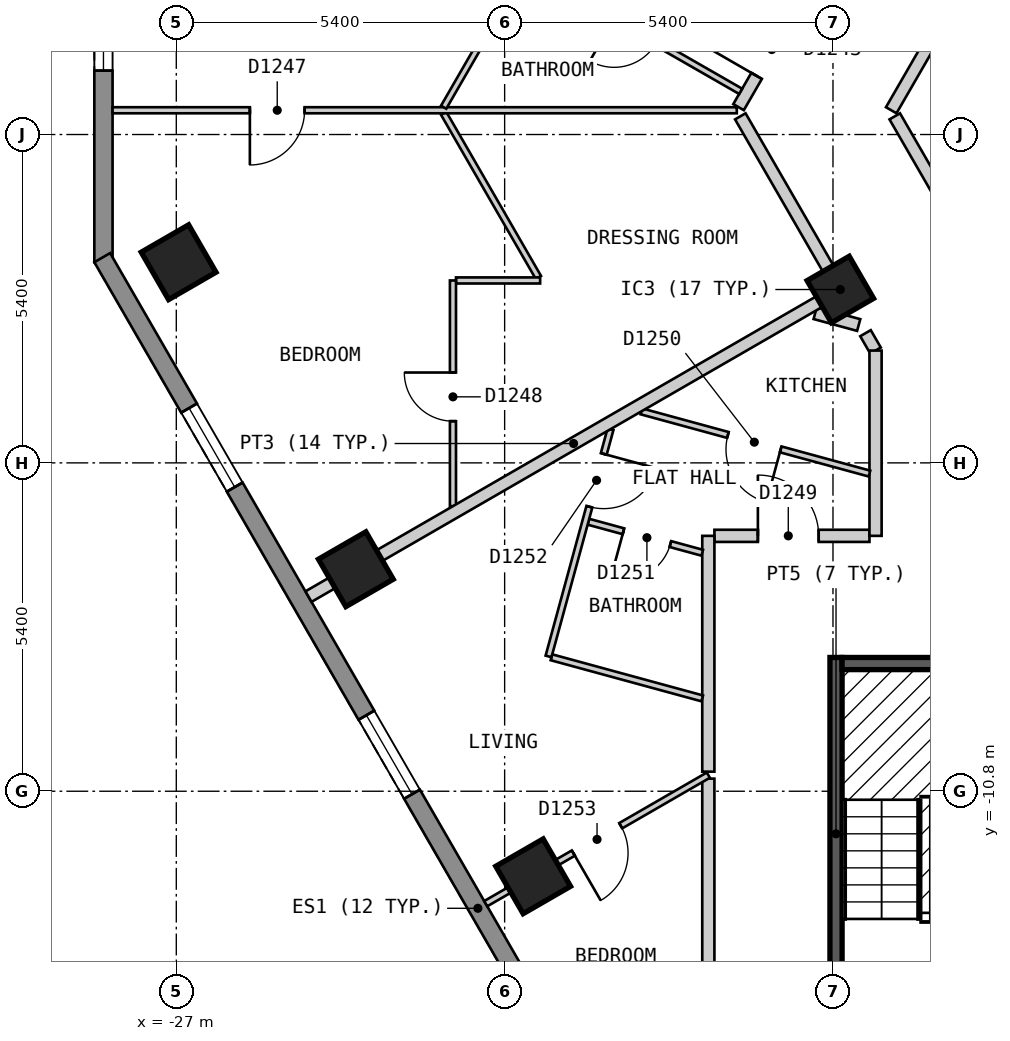
"""IFC4 building model, lengths in metres.
Left out: names, types, materials, properties, quantities, classifications, styles, units other than length and angle.
Written with IfcOpenShell. Run it as: python <this file> out.ifc"""

import sys

from ifc_helpers import new_model, si_unit, direction, frame, frame_2d, origin, origin_2d, place, context, subcontext, project, spatial, polyline, rectangle, outline, extrude, element, fill, save


model = new_model("IFC4")
c1 = context("Model", 3, precision=1e-05, world=origin(), true_north=direction((0.0, 1.0)))
c2 = subcontext(c1, "Body", "Model", "MODEL_VIEW")
j1 = project(units=[si_unit("LENGTHUNIT", "METRE"), si_unit("PLANEANGLEUNIT", "RADIAN")], contexts=[c1])
p1 = place(None, origin())
s1 = spatial("IfcSite", under=j1, at=p1, CompositionType="ELEMENT")
p2 = place(p1, origin())
s2 = spatial("IfcBuilding", under=s1, at=p2, CompositionType="ELEMENT")
p3 = place(p2, frame((0.0, 0.0, 129.6)))
s3 = spatial("IfcBuildingStorey", under=s2, at=p3, CompositionType="ELEMENT", Elevation=129.6)
for number, where, z_axis, x_axis in (
    (1, (-26.962, -2.1, 0.0), (0.0, 0.0, 1.0), (0.5, -0.866, 0.0)),
    (2, (-24.047, -7.149, 0.0), (0.0, 0.0, 1.0), (0.5, -0.866, 0.0)),
    (3, (-21.131, -12.199, 0.0), (0.0, 0.0, 1.0), (0.5, -0.866, 0.0)),
):
    element("IfcColumn", number, at=place(p3, frame(where, z_axis=z_axis, x_axis=x_axis)), inside=s3, PredefinedType="COLUMN", context=c2, shape_type="SweptSolid", body=[
        extrude(rectangle(XDim=0.9, YDim=0.9, at=origin_2d()), origin(), (0.0, 0.0, 1.0), 3.0),
    ])
p4 = place(p3, frame((-16.079, -2.549, 0.0), z_axis=(0.0, 0.0, 1.0), x_axis=(0.5, -0.866025403784, 0.0)))
e4 = element("IfcColumn", 4, at=p4, inside=s3, PredefinedType="COLUMN", context=c2, shape_type="SweptSolid", body=[
    extrude(rectangle(XDim=0.8, YDim=0.8, at=origin_2d()), origin(), (0.0, 0.0, 1.0), 3.0),
])
p5 = place(p3, frame((-28.198, 2.9, 0.0), z_axis=(0.0, 0.0, 1.0), x_axis=(0.0, -1.0, 0.0)))
e5 = element("IfcWall", 5, at=p5, inside=s3, PredefinedType="SOLIDWALL", context=c2, shape_type="SweptSolid", body=[
    extrude(outline(polyline([(0.0, -0.15), (5.0, -0.15), (4.92, 0.15), (0.08, 0.15), (0.0, -0.15)])), origin(), (0.0, 0.0, 1.0), 2.7),
])
p6 = place(p5, frame((0.65, 0.0, 0.15)))
e6 = element("IfcOpeningElement", 6, at=p6, cuts=e5, PredefinedType="OPENING", context=c2, shape_type="SweptSolid", body=[
    extrude(rectangle(XDim=1.2, YDim=2.1, at=frame_2d((0.6, 1.05))), frame((0.0, 0.16, 0.0), z_axis=(0.0, -1.0, 0.0), x_axis=(1.0, 0.0, 0.0)), (0.0, 0.0, 1.0), 0.32),
])
p7 = place(p3, frame((-28.218, -2.025, 0.0), z_axis=(0.0, 0.0, 1.0), x_axis=(0.500017503135, -0.866015298109, 0.0)))
e7 = element("IfcWall", 7, at=p7, inside=s3, PredefinedType="SOLIDWALL", context=c2, shape_type="SweptSolid", body=[
    extrude(outline(polyline([(0.0, -0.15), (24.711, -0.15), (24.631, 0.15), (0.08, 0.15), (0.0, -0.15)])), origin(), (0.0, 0.0, 1.0), 2.7),
])
p8 = place(p7, frame((2.857, 0.0, 0.15)))
e8 = element("IfcOpeningElement", 8, at=p8, cuts=e7, PredefinedType="OPENING", context=c2, shape_type="SweptSolid", body=[
    extrude(rectangle(XDim=1.5, YDim=2.1, at=frame_2d((0.75, 1.05))), frame((0.0, 0.16, 0.0), z_axis=(0.0, -1.0, 0.0), x_axis=(1.0, 0.0, 0.0)), (0.0, 0.0, 1.0), 0.32),
])
p9 = place(p7, frame((8.689, 0.0, 0.15)))
e9 = element("IfcOpeningElement", 9, at=p9, cuts=e7, PredefinedType="OPENING", context=c2, shape_type="SweptSolid", body=[
    extrude(rectangle(XDim=1.5, YDim=2.1, at=frame_2d((0.75, 1.05))), frame((0.0, 0.16, 0.0), z_axis=(0.0, -1.0, 0.0), x_axis=(1.0, 0.0, 0.0)), (0.0, 0.0, 1.0), 0.32),
])
p10 = place(p7, frame((14.52, 0.0, 0.15)))
e10 = element("IfcOpeningElement", 10, at=p10, cuts=e7, PredefinedType="OPENING", context=c2, shape_type="SweptSolid", body=[
    extrude(rectangle(XDim=1.5, YDim=2.1, at=frame_2d((0.75, 1.05))), frame((0.0, 0.16, 0.0), z_axis=(0.0, -1.0, 0.0), x_axis=(1.0, 0.0, 0.0)), (0.0, 0.0, 1.0), 0.32),
])
p11 = place(p7, frame((20.351, 0.0, 0.15)))
e11 = element("IfcOpeningElement", 11, at=p11, cuts=e7, PredefinedType="OPENING", context=c2, shape_type="SweptSolid", body=[
    extrude(rectangle(XDim=1.5, YDim=2.1, at=frame_2d((0.75, 1.05))), frame((0.0, 0.16, 0.0), z_axis=(0.0, -1.0, 0.0), x_axis=(1.0, 0.0, 0.0)), (0.0, 0.0, 1.0), 0.32),
])
p12 = place(p3, frame((-15.184, 0.299, 0.0), z_axis=(0.0, 0.0, 1.0), x_axis=(0.500149577091, -0.865939028186, 0.0)))
e12 = element("IfcWall", 12, at=p12, inside=s3, PredefinedType="PARTITIONING", context=c2, shape_type="SweptSolid", body=[
    extrude(rectangle(XDim=3.463, YDim=0.2, at=frame_2d((1.732, 0.0))), origin(), (0.0, 0.0, 1.0), 2.7),
])
p13 = place(p3, frame((-17.724, 0.299, 0.0), z_axis=(0.0, 0.0, 1.0), x_axis=(0.499910220442, -0.866077231832, 0.0)))
e13 = element("IfcWall", 13, at=p13, inside=s3, PredefinedType="PARTITIONING", context=c2, shape_type="SweptSolid", body=[
    extrude(rectangle(XDim=3.189, YDim=0.2, at=frame_2d((1.594, 0.0))), origin(), (0.0, 0.0, 1.0), 2.7),
])
p14 = place(p3, frame((-15.665, -3.267, 0.0), z_axis=(0.0, 0.0, 1.0), x_axis=(0.499957196903, -0.866050114754, 0.0)))
e14 = element("IfcWall", 14, at=p14, inside=s3, PredefinedType="PARTITIONING", context=c2, shape_type="SweptSolid", body=[
    extrude(rectangle(XDim=0.33, YDim=0.2, at=frame_2d((0.165, 0.0))), origin(), (0.0, 0.0, 1.0), 2.7),
])
p15 = place(p3, frame((-18.25, -10.593, 0.0), z_axis=(0.0, 0.0, 1.0), x_axis=(0.0, -1.0, 0.0)))
e15 = element("IfcWall", 15, at=p15, inside=s3, PredefinedType="PARTITIONING", context=c2, shape_type="SweptSolid", body=[
    extrude(rectangle(XDim=5.706, YDim=0.2, at=frame_2d((2.853, 0.0))), origin(), (0.0, 0.0, 1.0), 2.7),
])
p16 = place(p3, frame((-18.15, -6.6, 0.0), z_axis=(0.0, 0.0, 1.0), x_axis=(1.0, 0.0, 0.0)))
e16 = element("IfcWall", 16, at=p16, inside=s3, PredefinedType="PARTITIONING", context=c2, shape_type="SweptSolid", body=[
    extrude(rectangle(XDim=2.55, YDim=0.2, at=frame_2d((1.275, 0.0))), origin(), (0.0, 0.0, 1.0), 2.7),
])
p17 = place(p16, frame((0.715, 0.0, 0.0)))
e17 = element("IfcOpeningElement", 17, at=p17, cuts=e16, PredefinedType="OPENING", context=c2, shape_type="SweptSolid", body=[
    extrude(rectangle(XDim=1.0, YDim=2.1, at=frame_2d((0.5, 1.05))), frame((0.0, 0.11, 0.0), z_axis=(0.0, -1.0, 0.0), x_axis=(1.0, 0.0, 0.0)), (0.0, 0.0, 1.0), 0.22),
])
p18 = place(p3, frame((-15.242, 0.399, 0.0), z_axis=(0.0, 0.0, 1.0), x_axis=(0.499953615651, 0.866052182145, 0.0)))
e18 = element("IfcWall", 18, at=p18, inside=s3, PredefinedType="PARTITIONING", context=c2, shape_type="SweptSolid", body=[
    extrude(rectangle(XDim=8.777, YDim=0.2, at=frame_2d((4.388, 0.0))), origin(), (0.0, 0.0, 1.0), 2.7),
])
p19 = place(p18, frame((3.938, 0.0, 0.0)))
e19 = element("IfcOpeningElement", 19, at=p19, cuts=e18, PredefinedType="OPENING", context=c2, shape_type="SweptSolid", body=[
    extrude(rectangle(XDim=0.9, YDim=2.1, at=frame_2d((0.45, 1.05))), frame((0.0, 0.11, 0.0), z_axis=(0.0, -1.0, 0.0), x_axis=(1.0, 0.0, 0.0)), (0.0, 0.0, 1.0), 0.22),
])
p20 = place(p3, frame((-17.753, 0.45, 0.0), z_axis=(0.0, 0.0, 1.0), x_axis=(0.499988552313, 0.866032013009, 0.0)))
e20 = element("IfcWall", 20, at=p20, inside=s3, PredefinedType="PARTITIONING", context=c2, shape_type="SweptSolid", body=[
    extrude(rectangle(XDim=16.917, YDim=0.2, at=frame_2d((8.458, 0.0))), origin(), (0.0, 0.0, 1.0), 2.7),
])
p21 = place(p20, frame((10.73, 0.0, 0.0)))
e21 = element("IfcOpeningElement", 21, at=p21, cuts=e20, PredefinedType="OPENING", context=c2, shape_type="SweptSolid", body=[
    extrude(rectangle(XDim=1.0, YDim=2.1, at=frame_2d((0.5, 1.05))), frame((0.0, 0.11, 0.0), z_axis=(0.0, -1.0, 0.0), x_axis=(1.0, 0.0, 0.0)), (0.0, 0.0, 1.0), 0.22),
])
p22 = place(p20, frame((0.594, 0.0, 0.0)))
e22 = element("IfcOpeningElement", 22, at=p22, cuts=e20, PredefinedType="OPENING", context=c2, shape_type="SweptSolid", body=[
    extrude(rectangle(XDim=1.0, YDim=2.1, at=frame_2d((0.5, 1.05))), frame((0.0, 0.11, 0.0), z_axis=(0.0, -1.0, 0.0), x_axis=(1.0, 0.0, 0.0)), (0.0, 0.0, 1.0), 0.22),
])
p23 = place(p3, frame((-15.5, -6.6, 0.0), z_axis=(0.0, 0.0, 1.0), x_axis=(0.0, 1.0, 0.0)))
e23 = element("IfcWall", 23, at=p23, inside=s3, PredefinedType="PARTITIONING", context=c2, shape_type="SweptSolid", body=[
    extrude(rectangle(XDim=3.047, YDim=0.2, at=frame_2d((1.523, 0.0))), origin(), (0.0, 0.0, 1.0), 2.7),
])
p24 = place(p3, frame((-18.25, -10.478, 0.0), z_axis=(0.0, 0.0, 1.0), x_axis=(0.0, 1.0, 0.0)))
e24 = element("IfcWall", 24, at=p24, inside=s3, PredefinedType="PARTITIONING", context=c2, shape_type="SweptSolid", body=[
    extrude(rectangle(XDim=3.878, YDim=0.2, at=frame_2d((1.939, 0.0))), origin(), (0.0, 0.0, 1.0), 2.7),
])
p25 = place(p3, frame((-22.603, 0.349, 0.0), z_axis=(0.0, 0.0, 1.0), x_axis=(0.499930403552, -0.866065581584, 0.0)))
e25 = element("IfcWall", 25, at=p25, inside=s3, PredefinedType="PARTITIONING", context=c2, shape_type="SweptSolid", body=[
    extrude(rectangle(XDim=3.117, YDim=0.1, at=frame_2d((1.558, 0.0))), origin(), (0.0, 0.0, 1.0), 2.7),
])
p26 = place(p3, frame((-19.351, -4.553, 0.0), z_axis=(0.0, 0.0, 1.0), x_axis=(0.964766719363, -0.263106779102, 0.0)))
e26 = element("IfcWall", 26, at=p26, inside=s3, PredefinedType="PARTITIONING", context=c2, shape_type="SweptSolid", body=[
    extrude(rectangle(XDim=3.888, YDim=0.1, at=frame_2d((1.944, 0.0))), origin(), (0.0, 0.0, 1.0), 2.7),
])
p27 = place(p26, frame((1.475, 0.0, 0.0)))
e27 = element("IfcOpeningElement", 27, at=p27, cuts=e26, PredefinedType="OPENING", context=c2, shape_type="SweptSolid", body=[
    extrude(rectangle(XDim=0.9, YDim=2.1, at=frame_2d((0.45, 1.05))), frame((0.0, 0.06, 0.0), z_axis=(0.0, -1.0, 0.0), x_axis=(1.0, 0.0, 0.0)), (0.0, 0.0, 1.0), 0.12),
])
p28 = place(p3, frame((-20.222, -6.368, 0.0), z_axis=(0.0, 0.0, 1.0), x_axis=(0.964827681618, -0.262883139024, 0.0)))
e28 = element("IfcWall", 28, at=p28, inside=s3, PredefinedType="PARTITIONING", context=c2, shape_type="SweptSolid", body=[
    extrude(rectangle(XDim=1.94, YDim=0.1, at=frame_2d((0.97, 0.0))), origin(), (0.0, 0.0, 1.0), 2.7),
])
p29 = place(p28, frame((0.597, 0.0, 0.0)))
e29 = element("IfcOpeningElement", 29, at=p29, cuts=e28, PredefinedType="OPENING", context=c2, shape_type="SweptSolid", body=[
    extrude(rectangle(XDim=0.8, YDim=2.1, at=frame_2d((0.4, 1.05))), frame((0.0, 0.06, 0.0), z_axis=(0.0, -1.0, 0.0), x_axis=(1.0, 0.0, 0.0)), (0.0, 0.0, 1.0), 0.12),
])
p30 = place(p3, frame((-20.83, -8.597, 0.0), z_axis=(0.0, 0.0, 1.0), x_axis=(0.964796691053, -0.262996853468, 0.0)))
e30 = element("IfcWall", 30, at=p30, inside=s3, PredefinedType="PARTITIONING", context=c2, shape_type="SweptSolid", body=[
    extrude(rectangle(XDim=2.571, YDim=0.1, at=frame_2d((1.285, 0.0))), origin(), (0.0, 0.0, 1.0), 2.7),
])
p31 = place(p3, frame((-21.231, 2.726, 0.0), z_axis=(0.0, 0.0, 1.0), x_axis=(0.867314299312, -0.497760892607, 0.0)))
e31 = element("IfcWall", 31, at=p31, inside=s3, PredefinedType="PARTITIONING", context=c2, shape_type="SweptSolid", body=[
    extrude(rectangle(XDim=4.05, YDim=0.1, at=frame_2d((2.025, 0.0))), origin(), (0.0, 0.0, 1.0), 2.7),
])
p32 = place(p31, frame((1.65, 0.0, 0.0)))
e32 = element("IfcOpeningElement", 32, at=p32, cuts=e31, PredefinedType="OPENING", context=c2, shape_type="SweptSolid", body=[
    extrude(rectangle(XDim=0.8, YDim=2.1, at=frame_2d((0.4, 1.05))), frame((0.0, 0.06, 0.0), z_axis=(0.0, -1.0, 0.0), x_axis=(1.0, 0.0, 0.0)), (0.0, 0.0, 1.0), 0.12),
])
p33 = place(p3, frame((-22.4, -2.4, 0.0), z_axis=(0.0, 0.0, 1.0), x_axis=(1.0, 0.0, 0.0)))
e33 = element("IfcWall", 33, at=p33, inside=s3, PredefinedType="PARTITIONING", context=c2, shape_type="SweptSolid", body=[
    extrude(rectangle(XDim=1.384, YDim=0.1, at=frame_2d((0.692, 0.0))), origin(), (0.0, 0.0, 1.0), 2.7),
])
p34 = place(p3, frame((-28.048, 0.399, 0.0), z_axis=(0.0, 0.0, 1.0), x_axis=(1.0, 0.0, 0.0)))
e34 = element("IfcWall", 34, at=p34, inside=s3, PredefinedType="PARTITIONING", context=c2, shape_type="SweptSolid", body=[
    extrude(rectangle(XDim=10.266, YDim=0.1, at=frame_2d((5.133, 0.0))), origin(), (0.0, 0.0, 1.0), 2.7),
])
p35 = place(p34, frame((2.258, 0.0, 0.0)))
e35 = element("IfcOpeningElement", 35, at=p35, cuts=e34, PredefinedType="OPENING", context=c2, shape_type="SweptSolid", body=[
    extrude(rectangle(XDim=0.9, YDim=2.1, at=frame_2d((0.45, 1.05))), frame((0.0, 0.06, 0.0), z_axis=(0.0, -1.0, 0.0), x_axis=(1.0, 0.0, 0.0)), (0.0, 0.0, 1.0), 0.12),
])
p36 = place(p3, frame((-22.603, 0.449, 0.0), z_axis=(0.0, 0.0, 1.0), x_axis=(0.500022588228, 0.866012362072, 0.0)))
e36 = element("IfcWall", 36, at=p36, inside=s3, PredefinedType="PARTITIONING", context=c2, shape_type="SweptSolid", body=[
    extrude(rectangle(XDim=5.328, YDim=0.1, at=frame_2d((2.664, 0.0))), origin(), (0.0, 0.0, 1.0), 2.7),
])
p37 = place(p36, frame((3.058, 0.0, 0.0)))
e37 = element("IfcOpeningElement", 37, at=p37, cuts=e36, PredefinedType="OPENING", context=c2, shape_type="SweptSolid", body=[
    extrude(rectangle(XDim=0.9, YDim=2.1, at=frame_2d((0.45, 1.05))), frame((0.0, 0.06, 0.0), z_axis=(0.0, -1.0, 0.0), x_axis=(1.0, 0.0, 0.0)), (0.0, 0.0, 1.0), 0.12),
])
p38 = place(p3, frame((-20.878, -8.583, 0.0), z_axis=(0.0, 0.0, 1.0), x_axis=(0.263144077993, 0.964756546605, 0.0)))
e38 = element("IfcWall", 38, at=p38, inside=s3, PredefinedType="PARTITIONING", context=c2, shape_type="SweptSolid", body=[
    extrude(rectangle(XDim=3.873, YDim=0.1, at=frame_2d((1.936, 0.0))), origin(), (0.0, 0.0, 1.0), 2.7),
])
p39 = place(p38, frame((2.552, 0.0, 0.0)))
e39 = element("IfcOpeningElement", 39, at=p39, cuts=e38, PredefinedType="OPENING", context=c2, shape_type="SweptSolid", body=[
    extrude(rectangle(XDim=0.9, YDim=2.1, at=frame_2d((0.45, 1.05))), frame((0.0, 0.06, 0.0), z_axis=(0.0, -1.0, 0.0), x_axis=(1.0, 0.0, 0.0)), (0.0, 0.0, 1.0), 0.12),
])
p40 = place(p3, frame((-22.45, -6.112, 0.0), z_axis=(0.0, 0.0, 1.0), x_axis=(0.0, 1.0, 0.0)))
e40 = element("IfcWall", 40, at=p40, inside=s3, PredefinedType="PARTITIONING", context=c2, shape_type="SweptSolid", body=[
    extrude(rectangle(XDim=3.712, YDim=0.1, at=frame_2d((1.856, 0.0))), origin(), (0.0, 0.0, 1.0), 2.7),
])
p41 = place(p40, frame((1.398, 0.0, 0.0)))
e41 = element("IfcOpeningElement", 41, at=p41, cuts=e40, PredefinedType="OPENING", context=c2, shape_type="SweptSolid", body=[
    extrude(rectangle(XDim=0.8, YDim=2.1, at=frame_2d((0.4, 1.05))), frame((0.0, 0.06, 0.0), z_axis=(0.0, -1.0, 0.0), x_axis=(1.0, 0.0, 0.0)), (0.0, 0.0, 1.0), 0.12),
])
p42 = place(p3, frame((-21.911, -12.649, 0.0), z_axis=(0.0, 0.0, 1.0), x_axis=(0.865984571374, 0.500070717141, 0.0)))
e42 = element("IfcWall", 42, at=p42, inside=s3, PredefinedType="PARTITIONING", context=c2, shape_type="SweptSolid", body=[
    extrude(rectangle(XDim=4.228, YDim=0.1, at=frame_2d((2.114, 0.0))), origin(), (0.0, 0.0, 1.0), 2.7),
])
p43 = place(p42, frame((1.664, 0.0, 0.0)))
e43 = element("IfcOpeningElement", 43, at=p43, cuts=e42, PredefinedType="OPENING", context=c2, shape_type="SweptSolid", body=[
    extrude(rectangle(XDim=0.9, YDim=2.1, at=frame_2d((0.45, 1.05))), frame((0.0, 0.06, 0.0), z_axis=(0.0, -1.0, 0.0), x_axis=(1.0, 0.0, 0.0)), (0.0, 0.0, 1.0), 0.12),
])
p44 = place(p3, frame((-16.493, -2.938, 0.0), z_axis=(0.0, 0.0, 1.0), x_axis=(0.964816958114, -0.262922493019, 0.0)))
e44 = element("IfcWall", 44, at=p44, inside=s3, PredefinedType="PARTITIONING", context=c2, shape_type="SweptSolid", body=[
    extrude(rectangle(XDim=0.742, YDim=0.2, at=frame_2d((0.371, 0.0))), origin(), (0.0, 0.0, 1.0), 2.7),
])
p45 = place(p3, frame((-24.826, -7.599, 0.0), z_axis=(0.0, 0.0, 1.0), x_axis=(0.86599621094, 0.500050560081, 0.0)))
e45 = element("IfcWall", 45, at=p45, inside=s3, PredefinedType="PARTITIONING", context=c2, shape_type="SweptSolid", body=[
    extrude(rectangle(XDim=10.069, YDim=0.2, at=frame_2d((5.035, 0.0))), origin(), (0.0, 0.0, 1.0), 2.7),
])
p46 = place(p3, frame((-16.15, -14.4, 0.0), z_axis=(0.0, 0.0, 1.0), x_axis=(0.0, 1.0, 0.0)))
e46 = element("IfcWall", 46, at=p46, inside=s3, PredefinedType="SOLIDWALL", context=c2, shape_type="SweptSolid", body=[
    extrude(rectangle(XDim=5.8, YDim=0.2, at=frame_2d((2.9, 0.0))), origin(), (0.0, 0.0, 1.0), 2.7),
])
p47 = place(p3, frame((-16.05, -8.7, 0.0), z_axis=(0.0, 0.0, 1.0), x_axis=(1.0, 0.0, 0.0)))
e47 = element("IfcWall", 47, at=p47, inside=s3, PredefinedType="SOLIDWALL", context=c2, shape_type="SweptSolid", body=[
    extrude(rectangle(XDim=2.75, YDim=0.2, at=frame_2d((1.375, 0.0))), origin(), (0.0, 0.0, 1.0), 2.7),
])
p48 = place(p6, origin())
e48 = element("IfcWindow", 48, at=p48, inside=s3, PartitioningType="SINGLE_PANEL", PredefinedType="WINDOW", context=c2, shape_type="SweptSolid", body=[
    extrude(rectangle(XDim=1.2, YDim=2.1, at=frame_2d((0.6, 1.05))), frame((0.0, 0.03, 0.0), z_axis=(0.0, -1.0, 0.0), x_axis=(1.0, 0.0, 0.0)), (0.0, 0.0, 1.0), 0.06),
])
fill(e6, e48)
p49 = place(p8, origin())
e49 = element("IfcWindow", 49, at=p49, inside=s3, PartitioningType="SINGLE_PANEL", PredefinedType="WINDOW", context=c2, shape_type="SweptSolid", body=[
    extrude(rectangle(XDim=1.5, YDim=2.1, at=frame_2d((0.75, 1.05))), frame((0.0, 0.03, 0.0), z_axis=(0.0, -1.0, 0.0), x_axis=(1.0, 0.0, 0.0)), (0.0, 0.0, 1.0), 0.06),
])
fill(e8, e49)
p50 = place(p9, origin())
e50 = element("IfcWindow", 50, at=p50, inside=s3, PartitioningType="SINGLE_PANEL", PredefinedType="WINDOW", context=c2, shape_type="SweptSolid", body=[
    extrude(rectangle(XDim=1.5, YDim=2.1, at=frame_2d((0.75, 1.05))), frame((0.0, 0.03, 0.0), z_axis=(0.0, -1.0, 0.0), x_axis=(1.0, 0.0, 0.0)), (0.0, 0.0, 1.0), 0.06),
])
fill(e9, e50)
p51 = place(p22, origin())
e51 = element("IfcDoor", 51, at=p51, inside=s3, OperationType="SINGLE_SWING_LEFT", PredefinedType="DOOR", context=c2, shape_type="SweptSolid", body=[
    extrude(rectangle(XDim=1.0, YDim=2.1, at=frame_2d((0.5, 1.05))), frame((0.0, 0.025, 0.0), z_axis=(0.0, -1.0, 0.0), x_axis=(1.0, 0.0, 0.0)), (0.0, 0.0, 1.0), 0.05),
])
fill(e22, e51)
p52 = place(p35, origin())
e52 = element("IfcDoor", 52, at=p52, inside=s3, OperationType="SINGLE_SWING_LEFT", PredefinedType="DOOR", context=c2, shape_type="SweptSolid", body=[
    extrude(rectangle(XDim=0.9, YDim=2.1, at=frame_2d((0.45, 1.05))), frame((0.0, 0.025, 0.0), z_axis=(0.0, -1.0, 0.0), x_axis=(1.0, 0.0, 0.0)), (0.0, 0.0, 1.0), 0.05),
])
fill(e35, e52)
p53 = place(p41, origin())
e53 = element("IfcDoor", 53, at=p53, inside=s3, OperationType="SINGLE_SWING_RIGHT", PredefinedType="DOOR", context=c2, shape_type="SweptSolid", body=[
    extrude(rectangle(XDim=0.8, YDim=2.1, at=frame_2d((0.4, 1.05))), frame((0.0, 0.025, 0.0), z_axis=(0.0, -1.0, 0.0), x_axis=(1.0, 0.0, 0.0)), (0.0, 0.0, 1.0), 0.05),
])
fill(e41, e53)
p54 = place(p17, origin())
e54 = element("IfcDoor", 54, at=p54, inside=s3, OperationType="SINGLE_SWING_LEFT", PredefinedType="DOOR", context=c2, shape_type="SweptSolid", body=[
    extrude(rectangle(XDim=1.0, YDim=2.1, at=frame_2d((0.5, 1.05))), frame((0.0, 0.025, 0.0), z_axis=(0.0, -1.0, 0.0), x_axis=(1.0, 0.0, 0.0)), (0.0, 0.0, 1.0), 0.05),
])
fill(e17, e54)
p55 = place(p27, origin())
e55 = element("IfcDoor", 55, at=p55, inside=s3, OperationType="SINGLE_SWING_RIGHT", PredefinedType="DOOR", context=c2, shape_type="SweptSolid", body=[
    extrude(rectangle(XDim=0.9, YDim=2.1, at=frame_2d((0.45, 1.05))), frame((0.0, 0.025, 0.0), z_axis=(0.0, -1.0, 0.0), x_axis=(1.0, 0.0, 0.0)), (0.0, 0.0, 1.0), 0.05),
])
fill(e27, e55)
p56 = place(p29, origin())
e56 = element("IfcDoor", 56, at=p56, inside=s3, OperationType="SINGLE_SWING_LEFT", PredefinedType="DOOR", context=c2, shape_type="SweptSolid", body=[
    extrude(rectangle(XDim=0.8, YDim=2.1, at=frame_2d((0.4, 1.05))), frame((0.0, 0.025, 0.0), z_axis=(0.0, -1.0, 0.0), x_axis=(1.0, 0.0, 0.0)), (0.0, 0.0, 1.0), 0.05),
])
fill(e29, e56)
p57 = place(p39, origin())
e57 = element("IfcDoor", 57, at=p57, inside=s3, OperationType="SINGLE_SWING_RIGHT", PredefinedType="DOOR", context=c2, shape_type="SweptSolid", body=[
    extrude(rectangle(XDim=0.9, YDim=2.1, at=frame_2d((0.45, 1.05))), frame((0.0, 0.025, 0.0), z_axis=(0.0, -1.0, 0.0), x_axis=(1.0, 0.0, 0.0)), (0.0, 0.0, 1.0), 0.05),
])
fill(e39, e57)
p58 = place(p43, origin())
e58 = element("IfcDoor", 58, at=p58, inside=s3, OperationType="SINGLE_SWING_LEFT", PredefinedType="DOOR", context=c2, shape_type="SweptSolid", body=[
    extrude(rectangle(XDim=0.9, YDim=2.1, at=frame_2d((0.45, 1.05))), frame((0.0, 0.025, 0.0), z_axis=(0.0, -1.0, 0.0), x_axis=(1.0, 0.0, 0.0)), (0.0, 0.0, 1.0), 0.05),
])
fill(e43, e58)
save(model, sys.argv[1])
